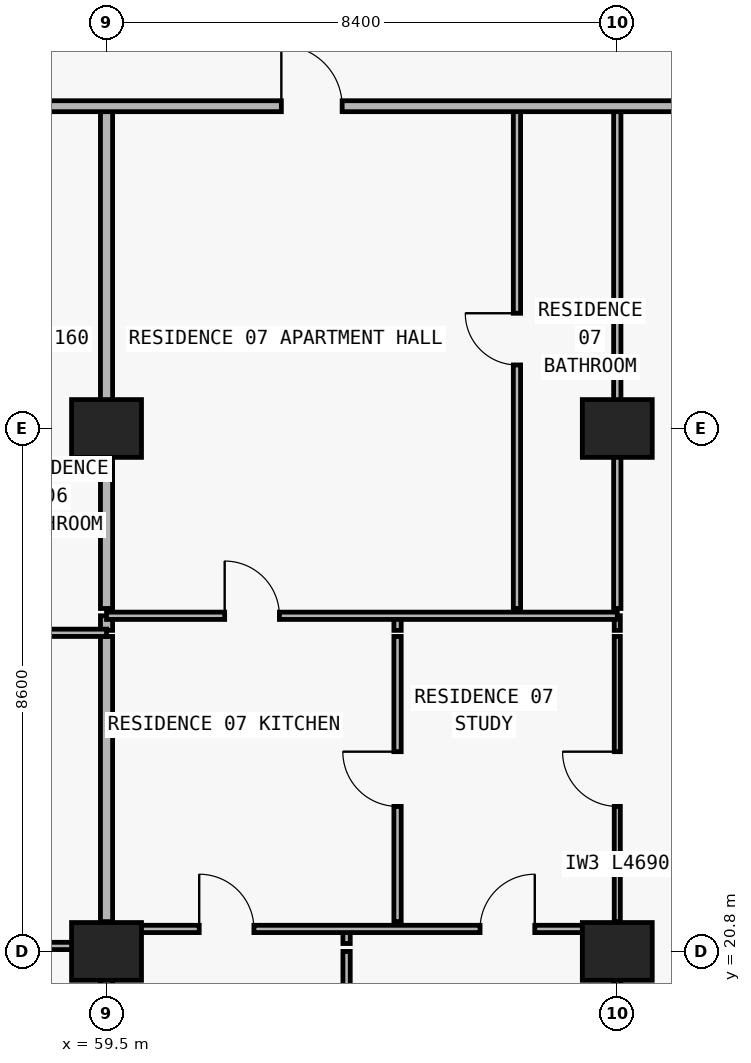
"""IFC4 building model, lengths in metres.
Left out: names, types, materials, properties, quantities, classifications, styles, units other than length and angle.
Written with IfcOpenShell. Run it as: python <this file> out.ifc"""

import sys

from ifc_helpers import new_model, si_unit, direction, frame, frame_2d, origin, origin_2d, place, context, subcontext, project, spatial, rectangle, extrude, element, fill, save


model = new_model("IFC4")
c1 = context("Model", 3, precision=1e-05, world=origin(), true_north=direction((0.0, 1.0)))
c2 = subcontext(c1, "Body", "Model", "MODEL_VIEW")
j1 = project(units=[si_unit("LENGTHUNIT", "METRE"), si_unit("PLANEANGLEUNIT", "RADIAN")], contexts=[c1])
p1 = place(None, origin())
s1 = spatial("IfcSite", under=j1, at=p1, CompositionType="ELEMENT")
p2 = place(p1, origin())
s2 = spatial("IfcBuilding", under=s1, at=p2, CompositionType="ELEMENT")
p3 = place(p2, frame((0.0, 0.0, 66.3)))
s3 = spatial("IfcBuildingStorey", under=s2, at=p3, CompositionType="ELEMENT", Elevation=66.3)
for number, where, z_axis, x_axis in (
    (1, (59.5, 20.8, 0.0), (0.0, 0.0, 1.0), (1.0, 0.0, 0.0)),
    (2, (67.9, 20.8, 0.0), (0.0, 0.0, 1.0), (1.0, 0.0, 0.0)),
    (3, (59.5, 29.4, 0.0), (0.0, 0.0, 1.0), (1.0, 0.0, 0.0)),
    (4, (67.9, 29.4, 0.0), (0.0, 0.0, 1.0), (1.0, 0.0, 0.0)),
):
    element("IfcColumn", number, at=place(p3, frame(where, z_axis=z_axis, x_axis=x_axis)), inside=s3, PredefinedType="COLUMN", context=c2, shape_type="SweptSolid", body=[
        extrude(rectangle(XDim=1.15, YDim=0.95, at=origin_2d()), origin(), (0.0, 0.0, 1.0), 3.05),
    ])
p4 = place(p3, frame((59.5, 6.24, 0.0), z_axis=(0.0, 0.0, 1.0), x_axis=(0.0, 1.0, 0.0)))
e5 = element("IfcWall", 5, at=p4, inside=s3, PredefinedType="PARTITIONING", context=c2, shape_type="SweptSolid", body=[
    extrude(rectangle(XDim=14.56, YDim=0.2, at=frame_2d((7.28, 0.0))), origin(), (0.0, 0.0, 1.0), 2.11),
])
p5 = place(p3, frame((59.5, 20.93, 0.0), z_axis=(0.0, 0.0, 1.0), x_axis=(0.0, 1.0, 0.0)))
e6 = element("IfcWall", 6, at=p5, inside=s3, PredefinedType="PARTITIONING", context=c2, shape_type="SweptSolid", body=[
    extrude(rectangle(XDim=0.24, YDim=0.2, at=frame_2d((0.12, 0.0))), origin(), (0.0, 0.0, 1.0), 3.05),
])
p6 = place(p3, frame((59.5, 21.29, 0.0), z_axis=(0.0, 0.0, 1.0), x_axis=(0.0, 1.0, 0.0)))
e7 = element("IfcWall", 7, at=p6, inside=s3, PredefinedType="PARTITIONING", context=c2, shape_type="SweptSolid", body=[
    extrude(rectangle(XDim=4.69, YDim=0.2, at=frame_2d((2.345, 0.0))), origin(), (0.0, 0.0, 1.0), 2.11),
])
p7 = place(p3, frame((59.5, 26.08, 0.0), z_axis=(0.0, 0.0, 1.0), x_axis=(0.0, 1.0, 0.0)))
e8 = element("IfcWall", 8, at=p7, inside=s3, PredefinedType="PARTITIONING", context=c2, shape_type="SweptSolid", body=[
    extrude(rectangle(XDim=0.24, YDim=0.2, at=frame_2d((0.12, 0.0))), origin(), (0.0, 0.0, 1.0), 2.11),
])
p8 = place(p3, frame((59.5, 26.44, 0.0), z_axis=(0.0, 0.0, 1.0), x_axis=(0.0, 1.0, 0.0)))
e9 = element("IfcWall", 9, at=p8, inside=s3, PredefinedType="PARTITIONING", context=c2, shape_type="SweptSolid", body=[
    extrude(rectangle(XDim=8.26, YDim=0.2, at=frame_2d((4.13, 0.0))), origin(), (0.0, 0.0, 1.0), 2.11),
])
p9 = place(p3, frame((63.448, 6.24, 0.0), z_axis=(0.0, 0.0, 1.0), x_axis=(0.0, 1.0, 0.0)))
e10 = element("IfcWall", 10, at=p9, inside=s3, PredefinedType="PARTITIONING", context=c2, shape_type="SweptSolid", body=[
    extrude(rectangle(XDim=14.56, YDim=0.12, at=frame_2d((7.28, 0.0))), origin(), (0.0, 0.0, 1.0), 2.423),
])
p10 = place(p3, frame((63.448, 20.93, 0.0), z_axis=(0.0, 0.0, 1.0), x_axis=(0.0, 1.0, 0.0)))
e11 = element("IfcWall", 11, at=p10, inside=s3, PredefinedType="PARTITIONING", context=c2, shape_type="SweptSolid", body=[
    extrude(rectangle(XDim=0.24, YDim=0.12, at=frame_2d((0.12, 0.0))), origin(), (0.0, 0.0, 1.0), 2.423),
])
p11 = place(p3, frame((64.286, 21.29, 0.0), z_axis=(0.0, 0.0, 1.0), x_axis=(0.0, 1.0, 0.0)))
e12 = element("IfcWall", 12, at=p11, inside=s3, PredefinedType="PARTITIONING", context=c2, shape_type="SweptSolid", body=[
    extrude(rectangle(XDim=4.69, YDim=0.12, at=frame_2d((2.345, 0.0))), origin(), (0.0, 0.0, 1.0), 3.05),
])
p12 = place(p11, frame((1.895, 0.0, 0.0)))
e13 = element("IfcOpeningElement", 13, at=p12, cuts=e12, PredefinedType="OPENING", context=c2, shape_type="SweptSolid", body=[
    extrude(rectangle(XDim=0.9, YDim=2.15, at=frame_2d((0.45, 1.075))), frame((0.0, 0.07, 0.0), z_axis=(0.0, -1.0, 0.0), x_axis=(1.0, 0.0, 0.0)), (0.0, 0.0, 1.0), 0.14),
])
p13 = place(p3, frame((64.286, 26.08, 0.0), z_axis=(0.0, 0.0, 1.0), x_axis=(0.0, 1.0, 0.0)))
e14 = element("IfcWall", 14, at=p13, inside=s3, PredefinedType="PARTITIONING", context=c2, shape_type="SweptSolid", body=[
    extrude(rectangle(XDim=0.24, YDim=0.12, at=frame_2d((0.12, 0.0))), origin(), (0.0, 0.0, 1.0), 3.05),
])
p14 = place(p3, frame((66.25, 26.44, 0.0), z_axis=(0.0, 0.0, 1.0), x_axis=(0.0, 1.0, 0.0)))
e15 = element("IfcWall", 15, at=p14, inside=s3, PredefinedType="PARTITIONING", context=c2, shape_type="SweptSolid", body=[
    extrude(rectangle(XDim=8.26, YDim=0.12, at=frame_2d((4.13, 0.0))), origin(), (0.0, 0.0, 1.0), 3.05),
])
p15 = place(p14, frame((4.005, 0.0, 0.0)))
e16 = element("IfcOpeningElement", 16, at=p15, cuts=e15, PredefinedType="OPENING", context=c2, shape_type="SweptSolid", body=[
    extrude(rectangle(XDim=0.85, YDim=2.1, at=frame_2d((0.425, 1.05))), frame((0.0, 0.07, 0.0), z_axis=(0.0, -1.0, 0.0), x_axis=(1.0, 0.0, 0.0)), (0.0, 0.0, 1.0), 0.14),
])
p16 = place(p3, frame((67.9, 6.24, 0.0), z_axis=(0.0, 0.0, 1.0), x_axis=(0.0, 1.0, 0.0)))
e17 = element("IfcWall", 17, at=p16, inside=s3, PredefinedType="PARTITIONING", context=c2, shape_type="SweptSolid", body=[
    extrude(rectangle(XDim=14.56, YDim=0.12, at=frame_2d((7.28, 0.0))), origin(), (0.0, 0.0, 1.0), 2.11),
])
p17 = place(p3, frame((67.9, 20.93, 0.0), z_axis=(0.0, 0.0, 1.0), x_axis=(0.0, 1.0, 0.0)))
e18 = element("IfcWall", 18, at=p17, inside=s3, PredefinedType="PARTITIONING", context=c2, shape_type="SweptSolid", body=[
    extrude(rectangle(XDim=0.24, YDim=0.12, at=frame_2d((0.12, 0.0))), origin(), (0.0, 0.0, 1.0), 3.05),
])
p18 = place(p3, frame((67.9, 21.29, 0.0), z_axis=(0.0, 0.0, 1.0), x_axis=(0.0, 1.0, 0.0)))
e19 = element("IfcWall", 19, at=p18, inside=s3, PredefinedType="MOVABLE", context=c2, shape_type="SweptSolid", body=[
    extrude(rectangle(XDim=4.69, YDim=0.1, at=frame_2d((2.345, 0.0))), origin(), (0.0, 0.0, 1.0), 2.11),
])
p19 = place(p18, frame((1.895, 0.0, 0.0)))
e20 = element("IfcOpeningElement", 20, at=p19, cuts=e19, PredefinedType="OPENING", context=c2, shape_type="SweptSolid", body=[
    extrude(rectangle(XDim=0.9, YDim=2.06, at=frame_2d((0.45, 1.03))), frame((0.0, 0.06, 0.0), z_axis=(0.0, -1.0, 0.0), x_axis=(1.0, 0.0, 0.0)), (0.0, 0.0, 1.0), 0.12),
])
p20 = place(p3, frame((67.9, 26.08, 0.0), z_axis=(0.0, 0.0, 1.0), x_axis=(0.0, 1.0, 0.0)))
e21 = element("IfcWall", 21, at=p20, inside=s3, PredefinedType="MOVABLE", context=c2, shape_type="SweptSolid", body=[
    extrude(rectangle(XDim=0.24, YDim=0.1, at=frame_2d((0.12, 0.0))), origin(), (0.0, 0.0, 1.0), 2.11),
])
p21 = place(p3, frame((67.9, 26.44, 0.0), z_axis=(0.0, 0.0, 1.0), x_axis=(0.0, 1.0, 0.0)))
e22 = element("IfcWall", 22, at=p21, inside=s3, PredefinedType="PARTITIONING", context=c2, shape_type="SweptSolid", body=[
    extrude(rectangle(XDim=8.26, YDim=0.12, at=frame_2d((4.13, 0.0))), origin(), (0.0, 0.0, 1.0), 2.11),
])
p22 = place(p3, frame((51.37, 20.89, 0.0), z_axis=(0.0, 0.0, 1.0), x_axis=(1.0, 0.0, 0.0)))
e23 = element("IfcWall", 23, at=p22, inside=s3, PredefinedType="PARTITIONING", context=c2, shape_type="SweptSolid", body=[
    extrude(rectangle(XDim=8.13, YDim=0.12, at=frame_2d((4.065, 0.0))), origin(), (0.0, 0.0, 1.0), 2.11),
])
p23 = place(p22, frame((1.683, 0.0, 0.0)))
e24 = element("IfcOpeningElement", 24, at=p23, cuts=e23, PredefinedType="OPENING", context=c2, shape_type="SweptSolid", body=[
    extrude(rectangle(XDim=0.9, YDim=2.06, at=frame_2d((0.45, 1.03))), frame((0.0, 0.07, 0.0), z_axis=(0.0, -1.0, 0.0), x_axis=(1.0, 0.0, 0.0)), (0.0, 0.0, 1.0), 0.14),
])
p24 = place(p22, frame((5.79, 0.0, 0.0)))
e25 = element("IfcOpeningElement", 25, at=p24, cuts=e23, PredefinedType="OPENING", context=c2, shape_type="SweptSolid", body=[
    extrude(rectangle(XDim=0.9, YDim=2.06, at=frame_2d((0.45, 1.03))), frame((0.0, 0.07, 0.0), z_axis=(0.0, -1.0, 0.0), x_axis=(1.0, 0.0, 0.0)), (0.0, 0.0, 1.0), 0.14),
])
p25 = place(p3, frame((59.5, 21.17, 0.0), z_axis=(0.0, 0.0, 1.0), x_axis=(1.0, 0.0, 0.0)))
e26 = element("IfcWall", 26, at=p25, inside=s3, PredefinedType="PARTITIONING", context=c2, shape_type="SweptSolid", body=[
    extrude(rectangle(XDim=8.4, YDim=0.12, at=frame_2d((4.2, 0.0))), origin(), (0.0, 0.0, 1.0), 3.05),
])
p26 = place(p25, frame((1.524, 0.0, 0.0)))
e27 = element("IfcOpeningElement", 27, at=p26, cuts=e26, PredefinedType="OPENING", context=c2, shape_type="SweptSolid", body=[
    extrude(rectangle(XDim=0.9, YDim=2.15, at=frame_2d((0.45, 1.075))), frame((0.0, 0.07, 0.0), z_axis=(0.0, -1.0, 0.0), x_axis=(1.0, 0.0, 0.0)), (0.0, 0.0, 1.0), 0.14),
])
p27 = place(p25, frame((6.143, 0.0, 0.0)))
e28 = element("IfcOpeningElement", 28, at=p27, cuts=e26, PredefinedType="OPENING", context=c2, shape_type="SweptSolid", body=[
    extrude(rectangle(XDim=0.9, YDim=2.15, at=frame_2d((0.45, 1.075))), frame((0.0, 0.07, 0.0), z_axis=(0.0, -1.0, 0.0), x_axis=(1.0, 0.0, 0.0)), (0.0, 0.0, 1.0), 0.14),
])
p28 = place(p3, frame((51.37, 26.04, 0.0), z_axis=(0.0, 0.0, 1.0), x_axis=(1.0, 0.0, 0.0)))
e29 = element("IfcWall", 29, at=p28, inside=s3, PredefinedType="PARTITIONING", context=c2, shape_type="SweptSolid", body=[
    extrude(rectangle(XDim=8.13, YDim=0.12, at=frame_2d((4.065, 0.0))), origin(), (0.0, 0.0, 1.0), 3.05),
])
p29 = place(p28, frame((1.683, 0.0, 0.0)))
e30 = element("IfcOpeningElement", 30, at=p29, cuts=e29, PredefinedType="OPENING", context=c2, shape_type="SweptSolid", body=[
    extrude(rectangle(XDim=0.9, YDim=2.15, at=frame_2d((0.45, 1.075))), frame((0.0, 0.07, 0.0), z_axis=(0.0, -1.0, 0.0), x_axis=(1.0, 0.0, 0.0)), (0.0, 0.0, 1.0), 0.14),
])
p30 = place(p3, frame((59.5, 26.32, 0.0), z_axis=(0.0, 0.0, 1.0), x_axis=(1.0, 0.0, 0.0)))
e31 = element("IfcWall", 31, at=p30, inside=s3, PredefinedType="PARTITIONING", context=c2, shape_type="SweptSolid", body=[
    extrude(rectangle(XDim=8.4, YDim=0.12, at=frame_2d((4.2, 0.0))), origin(), (0.0, 0.0, 1.0), 3.05),
])
p31 = place(p30, frame((1.943, 0.0, 0.0)))
e32 = element("IfcOpeningElement", 32, at=p31, cuts=e31, PredefinedType="OPENING", context=c2, shape_type="SweptSolid", body=[
    extrude(rectangle(XDim=0.9, YDim=2.15, at=frame_2d((0.45, 1.075))), frame((0.0, 0.07, 0.0), z_axis=(0.0, -1.0, 0.0), x_axis=(1.0, 0.0, 0.0)), (0.0, 0.0, 1.0), 0.14),
])
p32 = place(p3, frame((26.7, 34.7, 0.0), z_axis=(0.0, 0.0, 1.0), x_axis=(1.0, 0.0, 0.0)))
e33 = element("IfcWall", 33, at=p32, inside=s3, PredefinedType="PARTITIONING", context=c2, shape_type="SweptSolid", body=[
    extrude(rectangle(XDim=46.0, YDim=0.18, at=frame_2d((23.0, 0.0))), origin(), (0.0, 0.0, 1.0), 3.05),
])
p33 = place(p32, frame((2.875, 0.0, 0.0)))
e34 = element("IfcOpeningElement", 34, at=p33, cuts=e33, PredefinedType="OPENING", context=c2, shape_type="SweptSolid", body=[
    extrude(rectangle(XDim=1.0, YDim=2.2, at=frame_2d((0.5, 1.1))), frame((0.0, 0.1, 0.0), z_axis=(0.0, -1.0, 0.0), x_axis=(1.0, 0.0, 0.0)), (0.0, 0.0, 1.0), 0.2),
])
p34 = place(p32, frame((10.875, 0.0, 0.0)))
e35 = element("IfcOpeningElement", 35, at=p34, cuts=e33, PredefinedType="OPENING", context=c2, shape_type="SweptSolid", body=[
    extrude(rectangle(XDim=1.0, YDim=2.2, at=frame_2d((0.5, 1.1))), frame((0.0, 0.1, 0.0), z_axis=(0.0, -1.0, 0.0), x_axis=(1.0, 0.0, 0.0)), (0.0, 0.0, 1.0), 0.2),
])
p35 = place(p32, frame((18.875, 0.0, 0.0)))
e36 = element("IfcOpeningElement", 36, at=p35, cuts=e33, PredefinedType="OPENING", context=c2, shape_type="SweptSolid", body=[
    extrude(rectangle(XDim=1.0, YDim=2.2, at=frame_2d((0.5, 1.1))), frame((0.0, 0.1, 0.0), z_axis=(0.0, -1.0, 0.0), x_axis=(1.0, 0.0, 0.0)), (0.0, 0.0, 1.0), 0.2),
])
p36 = place(p32, frame((27.275, 0.0, 0.0)))
e37 = element("IfcOpeningElement", 37, at=p36, cuts=e33, PredefinedType="OPENING", context=c2, shape_type="SweptSolid", body=[
    extrude(rectangle(XDim=1.0, YDim=2.2, at=frame_2d((0.5, 1.1))), frame((0.0, 0.1, 0.0), z_axis=(0.0, -1.0, 0.0), x_axis=(1.0, 0.0, 0.0)), (0.0, 0.0, 1.0), 0.2),
])
p37 = place(p32, frame((35.675, 0.0, 0.0)))
e38 = element("IfcOpeningElement", 38, at=p37, cuts=e33, PredefinedType="OPENING", context=c2, shape_type="SweptSolid", body=[
    extrude(rectangle(XDim=1.0, YDim=2.2, at=frame_2d((0.5, 1.1))), frame((0.0, 0.1, 0.0), z_axis=(0.0, -1.0, 0.0), x_axis=(1.0, 0.0, 0.0)), (0.0, 0.0, 1.0), 0.2),
])
p38 = place(p37, origin())
e39 = element("IfcDoor", 39, at=p38, inside=s3, OperationType="SINGLE_SWING_LEFT", PredefinedType="DOOR", context=c2, shape_type="SweptSolid", body=[
    extrude(rectangle(XDim=1.0, YDim=2.2, at=frame_2d((0.5, 1.1))), frame((0.0, 0.025, 0.0), z_axis=(0.0, -1.0, 0.0), x_axis=(1.0, 0.0, 0.0)), (0.0, 0.0, 1.0), 0.05),
])
fill(e38, e39)
p39 = place(p15, origin())
e40 = element("IfcDoor", 40, at=p39, inside=s3, OperationType="SINGLE_SWING_RIGHT", PredefinedType="DOOR", context=c2, shape_type="SweptSolid", body=[
    extrude(rectangle(XDim=0.85, YDim=2.1, at=frame_2d((0.425, 1.05))), frame((0.0, 0.025, 0.0), z_axis=(0.0, -1.0, 0.0), x_axis=(1.0, 0.0, 0.0)), (0.0, 0.0, 1.0), 0.05),
])
fill(e16, e40)
p40 = place(p31, origin())
e41 = element("IfcDoor", 41, at=p40, inside=s3, OperationType="SINGLE_SWING_LEFT", PredefinedType="DOOR", context=c2, shape_type="SweptSolid", body=[
    extrude(rectangle(XDim=0.9, YDim=2.15, at=frame_2d((0.45, 1.075))), frame((0.0, 0.025, 0.0), z_axis=(0.0, -1.0, 0.0), x_axis=(1.0, 0.0, 0.0)), (0.0, 0.0, 1.0), 0.05),
])
fill(e32, e41)
p41 = place(p12, origin())
e42 = element("IfcDoor", 42, at=p41, inside=s3, OperationType="SINGLE_SWING_RIGHT", PredefinedType="DOOR", context=c2, shape_type="SweptSolid", body=[
    extrude(rectangle(XDim=0.9, YDim=2.15, at=frame_2d((0.45, 1.075))), frame((0.0, 0.025, 0.0), z_axis=(0.0, -1.0, 0.0), x_axis=(1.0, 0.0, 0.0)), (0.0, 0.0, 1.0), 0.05),
])
fill(e13, e42)
p42 = place(p26, origin())
e43 = element("IfcDoor", 43, at=p42, inside=s3, OperationType="SINGLE_SWING_LEFT", PredefinedType="DOOR", context=c2, shape_type="SweptSolid", body=[
    extrude(rectangle(XDim=0.9, YDim=2.15, at=frame_2d((0.45, 1.075))), frame((0.0, 0.025, 0.0), z_axis=(0.0, -1.0, 0.0), x_axis=(1.0, 0.0, 0.0)), (0.0, 0.0, 1.0), 0.05),
])
fill(e27, e43)
p43 = place(p27, origin())
e44 = element("IfcDoor", 44, at=p43, inside=s3, OperationType="SINGLE_SWING_RIGHT", PredefinedType="DOOR", context=c2, shape_type="SweptSolid", body=[
    extrude(rectangle(XDim=0.9, YDim=2.15, at=frame_2d((0.45, 1.075))), frame((0.0, 0.025, 0.0), z_axis=(0.0, -1.0, 0.0), x_axis=(1.0, 0.0, 0.0)), (0.0, 0.0, 1.0), 0.05),
])
fill(e28, e44)
p44 = place(p19, origin())
e45 = element("IfcDoor", 45, at=p44, inside=s3, OperationType="SINGLE_SWING_RIGHT", PredefinedType="DOOR", context=c2, shape_type="SweptSolid", body=[
    extrude(rectangle(XDim=0.9, YDim=2.06, at=frame_2d((0.45, 1.03))), frame((0.0, 0.025, 0.0), z_axis=(0.0, -1.0, 0.0), x_axis=(1.0, 0.0, 0.0)), (0.0, 0.0, 1.0), 0.05),
])
fill(e20, e45)
save(model, sys.argv[1])
